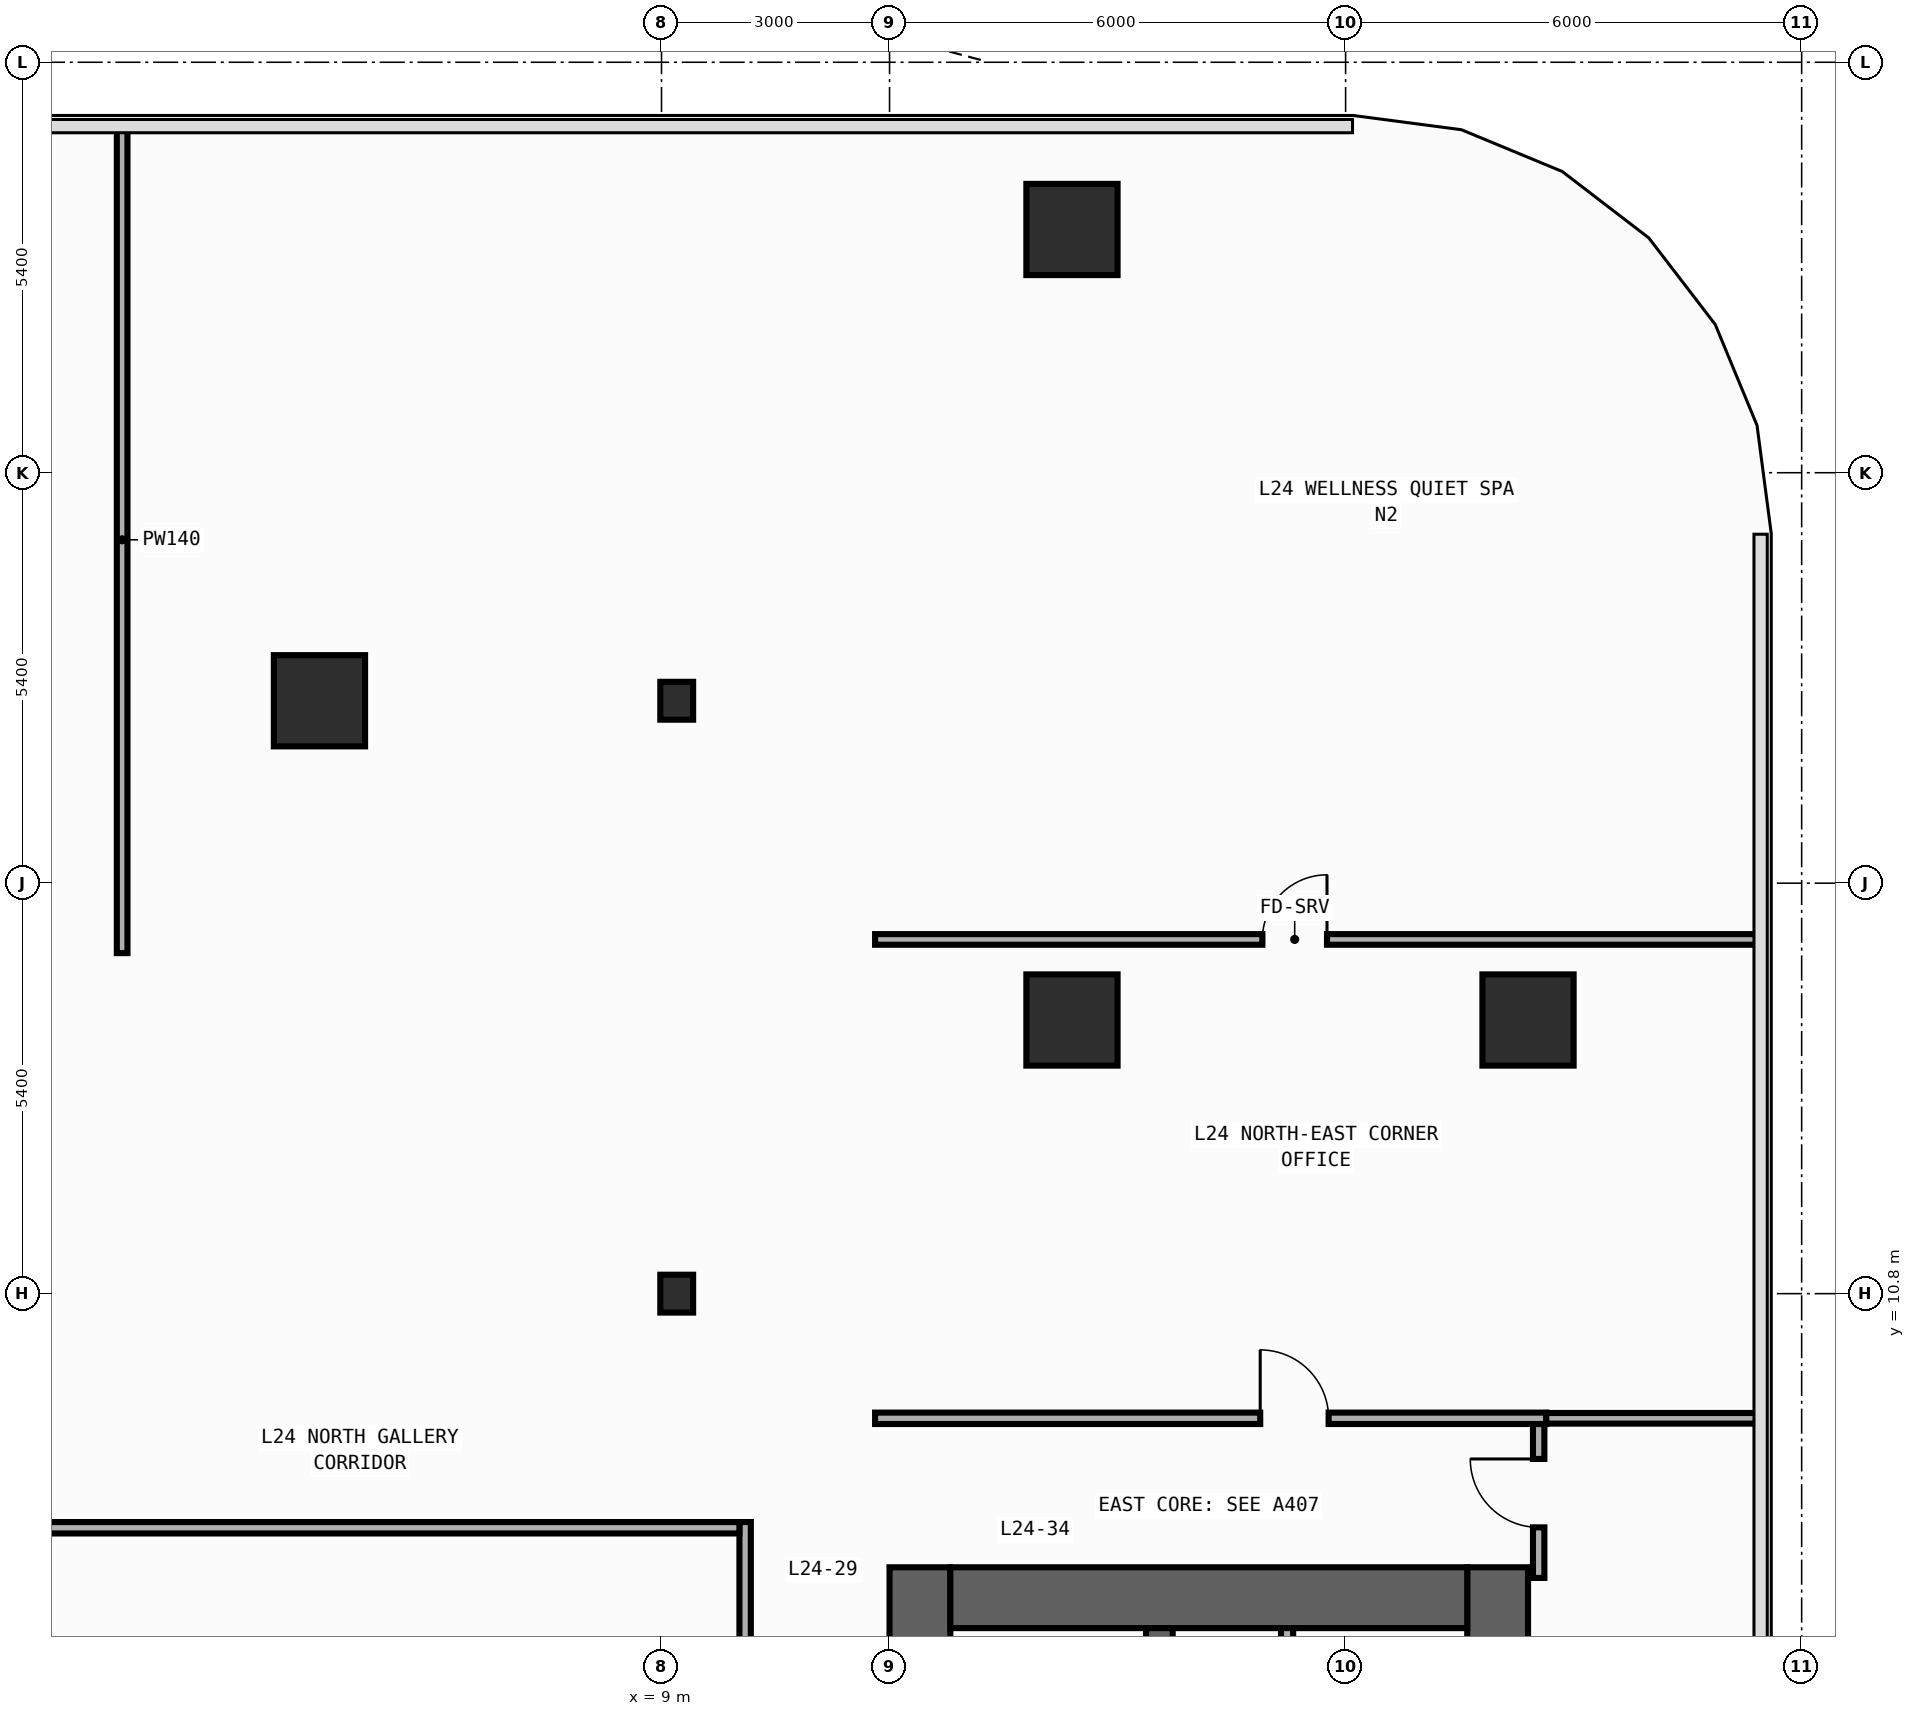
"""IFC4 building model, lengths in metres.
Left out: names, types, materials, properties, quantities, classifications, styles, units other than length and angle.
Written with IfcOpenShell. Run it as: python <this file> out.ifc"""

import sys

from ifc_helpers import new_model, si_unit, direction, frame, frame_2d, origin, origin_2d, place, context, subcontext, project, spatial, rectangle, i_section, extrude, element, fill, save


model = new_model("IFC4")
c1 = context("Model", 3, precision=1e-05, world=origin(), true_north=direction((0.0, 1.0)))
c2 = subcontext(c1, "Body", "Model", "MODEL_VIEW")
j1 = project(units=[si_unit("LENGTHUNIT", "METRE"), si_unit("PLANEANGLEUNIT", "RADIAN")], contexts=[c1])
p1 = place(None, origin())
s1 = spatial("IfcSite", under=j1, at=p1, CompositionType="ELEMENT")
p2 = place(p1, origin())
s2 = spatial("IfcBuilding", under=s1, at=p2, CompositionType="ELEMENT")
p3 = place(p2, frame((0.0, 0.0, 105.8)))
s3 = spatial("IfcBuildingStorey", under=s2, at=p3, CompositionType="ELEMENT", Elevation=105.8)
p4 = place(p3, frame((12.4, -19.8, 0.0), z_axis=(0.0, 0.0, 1.0), x_axis=(0.0, 1.0, 0.0)))
e1 = element("IfcWall", 1, at=p4, inside=s3, PredefinedType="SHEAR", context=c2, shape_type="SweptSolid", body=[
    extrude(rectangle(XDim=27.0, YDim=0.8, at=frame_2d((13.5, 0.0))), origin(), (0.0, 0.0, 1.0), 3.94),
])
p5 = place(p4, frame((23.05, 0.0, 0.0)))
e2 = element("IfcOpeningElement", 2, at=p5, cuts=e1, PredefinedType="OPENING", context=c2, shape_type="SweptSolid", body=[
    extrude(rectangle(XDim=1.1, YDim=2.2, at=frame_2d((0.55, 1.1))), frame((0.0, 0.41, 0.0), z_axis=(0.0, -1.0, 0.0), x_axis=(1.0, 0.0, 0.0)), (0.0, 0.0, 1.0), 0.82),
])
p6 = place(p4, frame((19.85, 0.0, 0.0)))
e3 = element("IfcOpeningElement", 3, at=p6, cuts=e1, PredefinedType="OPENING", context=c2, shape_type="SweptSolid", body=[
    extrude(rectangle(XDim=1.1, YDim=2.2, at=frame_2d((0.55, 1.1))), frame((0.0, 0.41, 0.0), z_axis=(0.0, -1.0, 0.0), x_axis=(1.0, 0.0, 0.0)), (0.0, 0.0, 1.0), 0.82),
])
p7 = place(p4, frame((16.65, 0.0, 0.0)))
e4 = element("IfcOpeningElement", 4, at=p7, cuts=e1, PredefinedType="OPENING", context=c2, shape_type="SweptSolid", body=[
    extrude(rectangle(XDim=1.1, YDim=2.2, at=frame_2d((0.55, 1.1))), frame((0.0, 0.41, 0.0), z_axis=(0.0, -1.0, 0.0), x_axis=(1.0, 0.0, 0.0)), (0.0, 0.0, 1.0), 0.82),
])
p8 = place(p4, frame((7.175, 0.0, 0.0)))
e5 = element("IfcOpeningElement", 5, at=p8, cuts=e1, PredefinedType="OPENING", context=c2, shape_type="SweptSolid", body=[
    extrude(rectangle(XDim=0.85, YDim=2.1, at=frame_2d((0.425, 1.05))), frame((0.0, 0.41, 0.0), z_axis=(0.0, -1.0, 0.0), x_axis=(1.0, 0.0, 0.0)), (0.0, 0.0, 1.0), 0.82),
])
p9 = place(p4, frame((10.375, 0.0, 0.0)))
e6 = element("IfcOpeningElement", 6, at=p9, cuts=e1, PredefinedType="OPENING", context=c2, shape_type="SweptSolid", body=[
    extrude(rectangle(XDim=0.85, YDim=2.1, at=frame_2d((0.425, 1.05))), frame((0.0, 0.41, 0.0), z_axis=(0.0, -1.0, 0.0), x_axis=(1.0, 0.0, 0.0)), (0.0, 0.0, 1.0), 0.82),
])
p10 = place(p4, frame((12.725, 0.0, 0.0)))
e7 = element("IfcOpeningElement", 7, at=p10, cuts=e1, PredefinedType="OPENING", context=c2, shape_type="SweptSolid", body=[
    extrude(rectangle(XDim=1.15, YDim=2.2, at=frame_2d((0.575, 1.1))), frame((0.0, 0.41, 0.0), z_axis=(0.0, -1.0, 0.0), x_axis=(1.0, 0.0, 0.0)), (0.0, 0.0, 1.0), 0.82),
])
p11 = place(p4, frame((25.125, 0.0, 0.0)))
e8 = element("IfcOpeningElement", 8, at=p11, cuts=e1, PredefinedType="OPENING", context=c2, shape_type="SweptSolid", body=[
    extrude(rectangle(XDim=0.85, YDim=2.1, at=frame_2d((0.425, 1.05))), frame((0.0, 0.41, 0.0), z_axis=(0.0, -1.0, 0.0), x_axis=(1.0, 0.0, 0.0)), (0.0, 0.0, 1.0), 0.82),
])
p12 = place(p3, frame((20.0, -19.8, 0.0), z_axis=(0.0, 0.0, 1.0), x_axis=(0.0, 1.0, 0.0)))
e9 = element("IfcWall", 9, at=p12, inside=s3, PredefinedType="SHEAR", context=c2, shape_type="SweptSolid", body=[
    extrude(rectangle(XDim=27.0, YDim=0.8, at=frame_2d((13.5, 0.0))), origin(), (0.0, 0.0, 1.0), 3.94),
])
p13 = place(p3, frame((12.8, 6.8, 0.0), z_axis=(0.0, 0.0, 1.0), x_axis=(1.0, 0.0, 0.0)))
e10 = element("IfcWall", 10, at=p13, inside=s3, PredefinedType="SHEAR", context=c2, shape_type="SweptSolid", body=[
    extrude(rectangle(XDim=6.8, YDim=0.8, at=frame_2d((3.4, 0.0))), origin(), (0.0, 0.0, 1.0), 3.94),
])
p14 = place(p3, frame((15.55, -19.0, 0.0), z_axis=(0.0, 0.0, 1.0), x_axis=(0.0, 1.0, 0.0)))
e11 = element("IfcWall", 11, at=p14, inside=s3, PredefinedType="SHEAR", context=c2, shape_type="SweptSolid", body=[
    extrude(rectangle(XDim=25.4, YDim=0.35, at=frame_2d((12.7, 0.0))), origin(), (0.0, 0.0, 1.0), 3.94),
])
p15 = place(p14, frame((11.925, 0.0, 0.0)))
e12 = element("IfcOpeningElement", 12, at=p15, cuts=e11, PredefinedType="OPENING", context=c2, shape_type="SweptSolid", body=[
    extrude(rectangle(XDim=1.15, YDim=2.2, at=frame_2d((0.575, 1.1))), frame((0.0, 0.185, 0.0), z_axis=(0.0, -1.0, 0.0), x_axis=(1.0, 0.0, 0.0)), (0.0, 0.0, 1.0), 0.37),
])
p16 = place(p14, frame((24.325, 0.0, 0.0)))
e13 = element("IfcOpeningElement", 13, at=p16, cuts=e11, PredefinedType="OPENING", context=c2, shape_type="SweptSolid", body=[
    extrude(rectangle(XDim=0.85, YDim=2.1, at=frame_2d((0.425, 1.05))), frame((0.0, 0.185, 0.0), z_axis=(0.0, -1.0, 0.0), x_axis=(1.0, 0.0, 0.0)), (0.0, 0.0, 1.0), 0.37),
])
for number, where, z_axis, x_axis in (
    (14, (9.2, 10.8, 0.0), (0.0, 0.0, 1.0), (1.0, 0.0, 0.0)),
    (15, (9.2, 18.6, 0.0), (0.0, 0.0, 1.0), (1.0, 0.0, 0.0)),
):
    element("IfcColumn", number, at=place(p3, frame(where, z_axis=z_axis, x_axis=x_axis)), inside=s3, PredefinedType="COLUMN", context=c2, shape_type="SweptSolid", body=[
        extrude(i_section(OverallWidth=0.432, OverallDepth=0.498, WebThickness=0.045, FlangeThickness=0.07, FilletRadius=0.022, at=origin_2d()), origin(), (0.0, 0.0, 1.0), 4.2),
    ])
for number, where, z_axis, x_axis in (
    (16, (20.4, 14.4, 0.0), (0.0, 0.0, 1.0), (1.0, 0.0, 0.0)),
    (17, (14.4, 14.4, 0.0), (0.0, 0.0, 1.0), (1.0, 0.0, 0.0)),
    (18, (4.5, 18.6, 0.0), (0.0, 0.0, 1.0), (1.0, 0.0, 0.0)),
    (19, (14.4, 24.8, 0.0), (0.0, 0.0, 1.0), (1.0, 0.0, 0.0)),
):
    element("IfcColumn", number, at=place(p3, frame(where, z_axis=z_axis, x_axis=x_axis)), inside=s3, PredefinedType="COLUMN", context=c2, shape_type="SweptSolid", body=[
        extrude(rectangle(XDim=1.2, YDim=1.2, at=origin_2d()), origin(), (0.0, 0.0, 1.0), 4.2),
    ])
p17 = place(p3, frame((17.23, 4.17, 0.0), z_axis=(0.0, 0.0, 1.0), x_axis=(0.0, 1.0, 0.0)))
e20 = element("IfcWall", 20, at=p17, inside=s3, PredefinedType="PARTITIONING", context=c2, shape_type="SweptSolid", body=[
    extrude(rectangle(XDim=2.23, YDim=0.16, at=frame_2d((1.115, 0.0))), origin(), (0.0, 0.0, 1.0), 3.94),
])
p18 = place(p17, frame((0.46, 0.0, 0.0)))
e21 = element("IfcOpeningElement", 21, at=p18, cuts=e20, PredefinedType="OPENING", context=c2, shape_type="SweptSolid", body=[
    extrude(rectangle(XDim=0.85, YDim=2.1, at=frame_2d((0.425, 1.05))), frame((0.0, 0.09, 0.0), z_axis=(0.0, -1.0, 0.0), x_axis=(1.0, 0.0, 0.0)), (0.0, 0.0, 1.0), 0.18),
])
p19 = place(p3, frame((10.1, -5.98, 0.0), z_axis=(0.0, 0.0, 1.0), x_axis=(0.0, 1.0, 0.0)))
e22 = element("IfcWall", 22, at=p19, inside=s3, PredefinedType="PARTITIONING", context=c2, shape_type="SweptSolid", body=[
    extrude(rectangle(XDim=13.775, YDim=0.15, at=frame_2d((6.887, 0.0))), origin(), (0.0, 0.0, 1.0), 3.94),
])
p20 = place(p19, frame((10.997, 0.0, 0.0)))
e23 = element("IfcOpeningElement", 23, at=p20, cuts=e22, PredefinedType="OPENING", context=c2, shape_type="SweptSolid", body=[
    extrude(rectangle(XDim=0.9, YDim=2.15, at=frame_2d((0.45, 1.075))), frame((0.0, 0.085, 0.0), z_axis=(0.0, -1.0, 0.0), x_axis=(1.0, 0.0, 0.0)), (0.0, 0.0, 1.0), 0.17),
])
p21 = place(p3, frame((-2.62, 7.72, 0.0), z_axis=(0.0, 0.0, 1.0), x_axis=(1.0, 0.0, 0.0)))
e24 = element("IfcWall", 24, at=p21, inside=s3, PredefinedType="PARTITIONING", context=c2, shape_type="SweptSolid", body=[
    extrude(rectangle(XDim=12.645, YDim=0.15, at=frame_2d((6.323, 0.0))), origin(), (0.0, 0.0, 1.0), 3.94),
])
p22 = place(p21, frame((2.264, 0.0, 0.0)))
e25 = element("IfcOpeningElement", 25, at=p22, cuts=e24, PredefinedType="OPENING", context=c2, shape_type="SweptSolid", body=[
    extrude(rectangle(XDim=0.9, YDim=2.15, at=frame_2d((0.45, 1.075))), frame((0.0, 0.085, 0.0), z_axis=(0.0, -1.0, 0.0), x_axis=(1.0, 0.0, 0.0)), (0.0, 0.0, 1.0), 0.17),
])
p23 = place(p3, frame((20.54, 7.06, 0.0), z_axis=(0.0, 0.0, 1.0), x_axis=(0.0, 1.0, 0.0)))
e26 = element("IfcWall", 26, at=p23, inside=s3, PredefinedType="PARTITIONING", context=c2, shape_type="SweptSolid", body=[
    extrude(rectangle(XDim=2.025, YDim=0.15, at=frame_2d((1.012, 0.0))), origin(), (0.0, 0.0, 1.0), 3.94),
])
p24 = place(p23, frame((0.665, 0.0, 0.0)))
e27 = element("IfcOpeningElement", 27, at=p24, cuts=e26, PredefinedType="OPENING", context=c2, shape_type="SweptSolid", body=[
    extrude(rectangle(XDim=0.9, YDim=2.15, at=frame_2d((0.45, 1.075))), frame((0.0, 0.085, 0.0), z_axis=(0.0, -1.0, 0.0), x_axis=(1.0, 0.0, 0.0)), (0.0, 0.0, 1.0), 0.17),
])
p25 = place(p3, frame((11.81, 9.16, 0.0), z_axis=(0.0, 0.0, 1.0), x_axis=(1.0, 0.0, 0.0)))
e28 = element("IfcWall", 28, at=p25, inside=s3, PredefinedType="PARTITIONING", context=c2, shape_type="SweptSolid", body=[
    extrude(rectangle(XDim=8.83, YDim=0.15, at=frame_2d((4.415, 0.0))), origin(), (0.0, 0.0, 1.0), 3.94),
])
p26 = place(p25, frame((5.067, 0.0, 0.0)))
e29 = element("IfcOpeningElement", 29, at=p26, cuts=e28, PredefinedType="OPENING", context=c2, shape_type="SweptSolid", body=[
    extrude(rectangle(XDim=0.9, YDim=2.15, at=frame_2d((0.45, 1.075))), frame((0.0, 0.085, 0.0), z_axis=(0.0, -1.0, 0.0), x_axis=(1.0, 0.0, 0.0)), (0.0, 0.0, 1.0), 0.17),
])
p27 = place(p3, frame((20.64, 9.16, 0.0), z_axis=(0.0, 0.0, 1.0), x_axis=(1.0, 0.0, 0.0)))
e30 = element("IfcWall", 30, at=p27, inside=s3, PredefinedType="PARTITIONING", context=c2, shape_type="SweptSolid", body=[
    extrude(rectangle(XDim=2.815, YDim=0.14, at=frame_2d((1.408, 0.0))), origin(), (0.0, 0.0, 1.0), 3.94),
])
p28 = place(p3, frame((11.81, 15.46, 0.0), z_axis=(0.0, 0.0, 1.0), x_axis=(1.0, 0.0, 0.0)))
e31 = element("IfcWall", 31, at=p28, inside=s3, PredefinedType="PARTITIONING", context=c2, shape_type="SweptSolid", body=[
    extrude(rectangle(XDim=11.645, YDim=0.14, at=frame_2d((5.823, 0.0))), origin(), (0.0, 0.0, 1.0), 3.94),
])
p29 = place(p28, frame((5.095, 0.0, 0.0)))
e32 = element("IfcOpeningElement", 32, at=p29, cuts=e31, PredefinedType="OPENING", context=c2, shape_type="SweptSolid", body=[
    extrude(rectangle(XDim=0.85, YDim=2.1, at=frame_2d((0.425, 1.05))), frame((0.0, 0.08, 0.0), z_axis=(0.0, -1.0, 0.0), x_axis=(1.0, 0.0, 0.0)), (0.0, 0.0, 1.0), 0.16),
])
p30 = place(p3, frame((1.904, 15.28, 0.0), z_axis=(0.0, 0.0, 1.0), x_axis=(0.0, 1.0, 0.0)))
e33 = element("IfcWall", 33, at=p30, inside=s3, PredefinedType="PARTITIONING", context=c2, shape_type="SweptSolid", body=[
    extrude(rectangle(XDim=10.875, YDim=0.14, at=frame_2d((5.438, 0.0))), origin(), (0.0, 0.0, 1.0), 3.94),
])
p31 = place(p24, origin())
e34 = element("IfcDoor", 34, at=p31, inside=s3, OperationType="SINGLE_SWING_RIGHT", PredefinedType="DOOR", context=c2, shape_type="SweptSolid", body=[
    extrude(rectangle(XDim=0.9, YDim=2.15, at=frame_2d((0.45, 1.075))), frame((0.0, 0.025, 0.0), z_axis=(0.0, -1.0, 0.0), x_axis=(1.0, 0.0, 0.0)), (0.0, 0.0, 1.0), 0.05),
])
fill(e27, e34)
p32 = place(p26, origin())
e35 = element("IfcDoor", 35, at=p32, inside=s3, OperationType="SINGLE_SWING_LEFT", PredefinedType="DOOR", context=c2, shape_type="SweptSolid", body=[
    extrude(rectangle(XDim=0.9, YDim=2.15, at=frame_2d((0.45, 1.075))), frame((0.0, 0.025, 0.0), z_axis=(0.0, -1.0, 0.0), x_axis=(1.0, 0.0, 0.0)), (0.0, 0.0, 1.0), 0.05),
])
fill(e29, e35)
p33 = place(p29, origin())
e36 = element("IfcDoor", 36, at=p33, inside=s3, OperationType="SINGLE_SWING_RIGHT", PredefinedType="DOOR", context=c2, shape_type="SweptSolid", body=[
    extrude(rectangle(XDim=0.85, YDim=2.1, at=frame_2d((0.425, 1.05))), frame((0.0, 0.025, 0.0), z_axis=(0.0, -1.0, 0.0), x_axis=(1.0, 0.0, 0.0)), (0.0, 0.0, 1.0), 0.05),
])
fill(e32, e36)
save(model, sys.argv[1])
